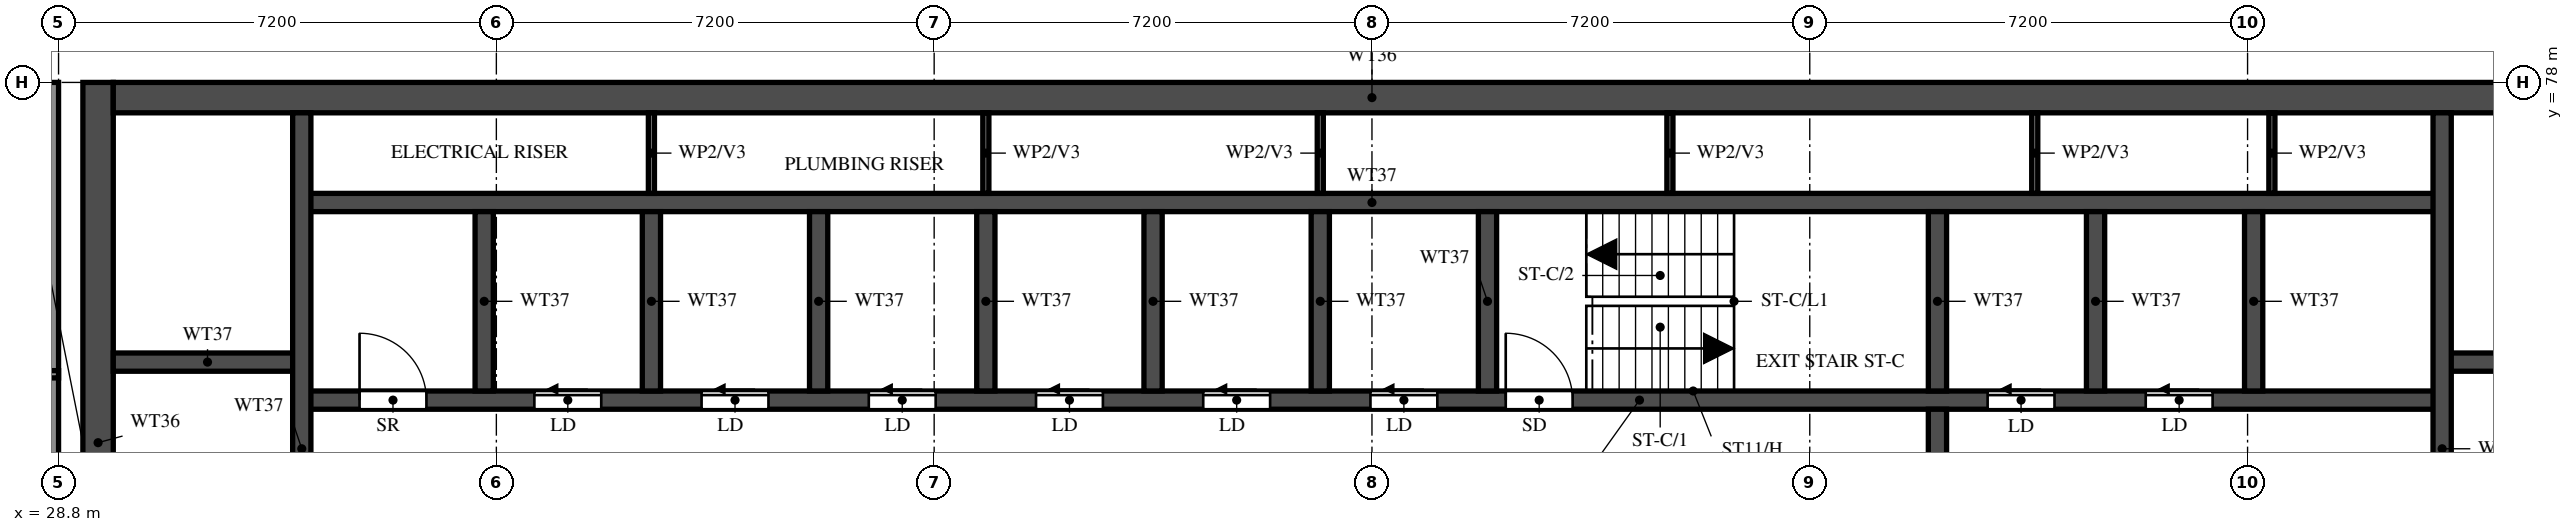
"""IFC4 building model, lengths in metres.
Left out: names, types, materials, properties, quantities, classifications, styles, units other than length and angle.
Written with IfcOpenShell. Run it as: python <this file> out.ifc"""

import sys

from ifc_helpers import new_model, si_unit, direction, frame, frame_2d, origin, place, context, subcontext, project, spatial, rectangle, extrude, element, fill, save


model = new_model("IFC4")
c1 = context("Model", 3, precision=1e-05, world=origin(), true_north=direction((0.0, 1.0)))
c2 = subcontext(c1, "Body", "Model", "MODEL_VIEW")
j1 = project(units=[si_unit("LENGTHUNIT", "METRE"), si_unit("PLANEANGLEUNIT", "RADIAN")], contexts=[c1])
p1 = place(None, origin())
s1 = spatial("IfcSite", under=j1, at=p1, CompositionType="ELEMENT")
p2 = place(p1, origin())
s2 = spatial("IfcBuilding", under=s1, at=p2, CompositionType="ELEMENT")
p3 = place(p2, frame((0.0, 0.0, 243.0)))
s3 = spatial("IfcBuildingStorey", under=s2, at=p3, CompositionType="ELEMENT", Elevation=243.0)
p4 = place(p3, frame((29.45, 66.15, 0.0), z_axis=(0.0, 0.0, 1.0), x_axis=(0.0, 1.0, 0.0)))
e1 = element("IfcWall", 1, at=p4, inside=s3, PredefinedType="SHEAR", context=c2, shape_type="SweptSolid", body=[
    extrude(rectangle(XDim=11.85, YDim=0.5, at=frame_2d((5.925, 0.0))), origin(), (0.0, 0.0, 1.0), 3.22),
])
p5 = place(p3, frame((29.7, 77.75, 0.0), z_axis=(0.0, 0.0, 1.0), x_axis=(1.0, 0.0, 0.0)))
e2 = element("IfcWall", 2, at=p5, inside=s3, PredefinedType="SHEAR", context=c2, shape_type="SweptSolid", body=[
    extrude(rectangle(XDim=41.4, YDim=0.5, at=frame_2d((20.7, 0.0))), origin(), (0.0, 0.0, 1.0), 3.22),
])
p6 = place(p3, frame((32.8, 72.775, 0.0), z_axis=(0.0, 0.0, 1.0), x_axis=(1.0, 0.0, 0.0)))
e3 = element("IfcWall", 3, at=p6, inside=s3, PredefinedType="SHEAR", context=c2, shape_type="SweptSolid", body=[
    extrude(rectangle(XDim=35.2, YDim=0.3, at=frame_2d((17.6, 0.0))), origin(), (0.0, 0.0, 1.0), 3.22),
])
p7 = place(p6, frame((19.8, 0.0, 0.0)))
e4 = element("IfcOpeningElement", 4, at=p7, cuts=e3, PredefinedType="OPENING", context=c2, shape_type="SweptSolid", body=[
    extrude(rectangle(XDim=1.1, YDim=2.1, at=frame_2d((0.55, 1.05))), frame((0.0, 0.16, 0.0), z_axis=(0.0, -1.0, 0.0), x_axis=(1.0, 0.0, 0.0)), (0.0, 0.0, 1.0), 0.32),
])
p8 = place(p6, frame((27.725, 0.0, 0.0)))
e5 = element("IfcOpeningElement", 5, at=p8, cuts=e3, PredefinedType="OPENING", context=c2, shape_type="SweptSolid", body=[
    extrude(rectangle(XDim=1.1, YDim=2.1, at=frame_2d((0.55, 1.05))), frame((0.0, 0.16, 0.0), z_axis=(0.0, -1.0, 0.0), x_axis=(1.0, 0.0, 0.0)), (0.0, 0.0, 1.0), 0.32),
])
p9 = place(p6, frame((30.325, 0.0, 0.0)))
e6 = element("IfcOpeningElement", 6, at=p9, cuts=e3, PredefinedType="OPENING", context=c2, shape_type="SweptSolid", body=[
    extrude(rectangle(XDim=1.1, YDim=2.1, at=frame_2d((0.55, 1.05))), frame((0.0, 0.16, 0.0), z_axis=(0.0, -1.0, 0.0), x_axis=(1.0, 0.0, 0.0)), (0.0, 0.0, 1.0), 0.32),
])
p10 = place(p6, frame((3.825, 0.0, 0.0)))
e7 = element("IfcOpeningElement", 7, at=p10, cuts=e3, PredefinedType="OPENING", context=c2, shape_type="SweptSolid", body=[
    extrude(rectangle(XDim=1.1, YDim=2.1, at=frame_2d((0.55, 1.05))), frame((0.0, 0.16, 0.0), z_axis=(0.0, -1.0, 0.0), x_axis=(1.0, 0.0, 0.0)), (0.0, 0.0, 1.0), 0.32),
])
p11 = place(p6, frame((6.575, 0.0, 0.0)))
e8 = element("IfcOpeningElement", 8, at=p11, cuts=e3, PredefinedType="OPENING", context=c2, shape_type="SweptSolid", body=[
    extrude(rectangle(XDim=1.1, YDim=2.1, at=frame_2d((0.55, 1.05))), frame((0.0, 0.16, 0.0), z_axis=(0.0, -1.0, 0.0), x_axis=(1.0, 0.0, 0.0)), (0.0, 0.0, 1.0), 0.32),
])
p12 = place(p6, frame((9.325, 0.0, 0.0)))
e9 = element("IfcOpeningElement", 9, at=p12, cuts=e3, PredefinedType="OPENING", context=c2, shape_type="SweptSolid", body=[
    extrude(rectangle(XDim=1.1, YDim=2.1, at=frame_2d((0.55, 1.05))), frame((0.0, 0.16, 0.0), z_axis=(0.0, -1.0, 0.0), x_axis=(1.0, 0.0, 0.0)), (0.0, 0.0, 1.0), 0.32),
])
p13 = place(p6, frame((12.075, 0.0, 0.0)))
e10 = element("IfcOpeningElement", 10, at=p13, cuts=e3, PredefinedType="OPENING", context=c2, shape_type="SweptSolid", body=[
    extrude(rectangle(XDim=1.1, YDim=2.1, at=frame_2d((0.55, 1.05))), frame((0.0, 0.16, 0.0), z_axis=(0.0, -1.0, 0.0), x_axis=(1.0, 0.0, 0.0)), (0.0, 0.0, 1.0), 0.32),
])
p14 = place(p6, frame((14.825, 0.0, 0.0)))
e11 = element("IfcOpeningElement", 11, at=p14, cuts=e3, PredefinedType="OPENING", context=c2, shape_type="SweptSolid", body=[
    extrude(rectangle(XDim=1.1, YDim=2.1, at=frame_2d((0.55, 1.05))), frame((0.0, 0.16, 0.0), z_axis=(0.0, -1.0, 0.0), x_axis=(1.0, 0.0, 0.0)), (0.0, 0.0, 1.0), 0.32),
])
p15 = place(p6, frame((17.575, 0.0, 0.0)))
e12 = element("IfcOpeningElement", 12, at=p15, cuts=e3, PredefinedType="OPENING", context=c2, shape_type="SweptSolid", body=[
    extrude(rectangle(XDim=1.1, YDim=2.1, at=frame_2d((0.55, 1.05))), frame((0.0, 0.16, 0.0), z_axis=(0.0, -1.0, 0.0), x_axis=(1.0, 0.0, 0.0)), (0.0, 0.0, 1.0), 0.32),
])
p16 = place(p6, frame((0.95, 0.0, 0.0)))
e13 = element("IfcOpeningElement", 13, at=p16, cuts=e3, PredefinedType="OPENING", context=c2, shape_type="SweptSolid", body=[
    extrude(rectangle(XDim=1.1, YDim=2.1, at=frame_2d((0.55, 1.05))), frame((0.0, 0.16, 0.0), z_axis=(0.0, -1.0, 0.0), x_axis=(1.0, 0.0, 0.0)), (0.0, 0.0, 1.0), 0.32),
])
p17 = place(p3, frame((32.8, 76.025, 0.0), z_axis=(0.0, 0.0, 1.0), x_axis=(1.0, 0.0, 0.0)))
e14 = element("IfcWall", 14, at=p17, inside=s3, PredefinedType="SHEAR", context=c2, shape_type="SweptSolid", body=[
    extrude(rectangle(XDim=35.2, YDim=0.3, at=frame_2d((17.6, 0.0))), origin(), (0.0, 0.0, 1.0), 3.22),
])
for number, where, z_axis, x_axis in (
    (15, (29.7, 73.4, 0.0), (0.0, 0.0, 1.0), (1.0, 0.0, 0.0)),
    (16, (68.0, 73.4, 0.0), (0.0, 0.0, 1.0), (1.0, 0.0, 0.0)),
):
    element("IfcWall", number, at=place(p3, frame(where, z_axis=z_axis, x_axis=x_axis)), inside=s3, PredefinedType="SHEAR", context=c2, shape_type="SweptSolid", body=[
        extrude(rectangle(XDim=3.1, YDim=0.3, at=frame_2d((1.55, 0.0))), origin(), (0.0, 0.0, 1.0), 3.22),
    ])
p18 = place(p3, frame((32.8, 66.45, 0.0), z_axis=(0.0, 0.0, 1.0), x_axis=(0.0, 1.0, 0.0)))
e17 = element("IfcWall", 17, at=p18, inside=s3, PredefinedType="SHEAR", context=c2, shape_type="SweptSolid", body=[
    extrude(rectangle(XDim=11.05, YDim=0.3, at=frame_2d((5.525, 0.0))), origin(), (0.0, 0.0, 1.0), 3.22),
])
p19 = place(p3, frame((68.0, 66.45, 0.0), z_axis=(0.0, 0.0, 1.0), x_axis=(0.0, 1.0, 0.0)))
e18 = element("IfcWall", 18, at=p19, inside=s3, PredefinedType="SHEAR", context=c2, shape_type="SweptSolid", body=[
    extrude(rectangle(XDim=11.05, YDim=0.3, at=frame_2d((5.525, 0.0))), origin(), (0.0, 0.0, 1.0), 3.22),
])
p20 = place(p19, frame((0.15, 0.0, 0.0)))
e19 = element("IfcOpeningElement", 19, at=p20, cuts=e18, PredefinedType="OPENING", context=c2, shape_type="SweptSolid", body=[
    extrude(rectangle(XDim=1.1, YDim=2.1, at=frame_2d((0.55, 1.05))), frame((0.0, 0.16, 0.0), z_axis=(0.0, -1.0, 0.0), x_axis=(1.0, 0.0, 0.0)), (0.0, 0.0, 1.0), 0.32),
])
p21 = place(p3, frame((59.7, 66.45, 0.0), z_axis=(0.0, 0.0, 1.0), x_axis=(0.0, 1.0, 0.0)))
e20 = element("IfcWall", 20, at=p21, inside=s3, PredefinedType="SHEAR", context=c2, shape_type="SweptSolid", body=[
    extrude(rectangle(XDim=6.175, YDim=0.3, at=frame_2d((3.087, 0.0))), origin(), (0.0, 0.0, 1.0), 3.22),
])
p22 = place(p21, frame((3.85, 0.0, 0.0)))
e21 = element("IfcOpeningElement", 21, at=p22, cuts=e20, PredefinedType="OPENING", context=c2, shape_type="SweptSolid", body=[
    extrude(rectangle(XDim=1.2, YDim=2.1, at=frame_2d((0.6, 1.05))), frame((0.0, 0.16, 0.0), z_axis=(0.0, -1.0, 0.0), x_axis=(1.0, 0.0, 0.0)), (0.0, 0.0, 1.0), 0.32),
])
for number, where, z_axis, x_axis in (
    (22, (59.7, 72.925, 0.0), (0.0, 0.0, 1.0), (0.0, 1.0, 0.0)),
    (23, (35.8, 72.925, 0.0), (0.0, 0.0, 1.0), (0.0, 1.0, 0.0)),
    (24, (38.55, 72.925, 0.0), (0.0, 0.0, 1.0), (0.0, 1.0, 0.0)),
    (25, (41.3, 72.925, 0.0), (0.0, 0.0, 1.0), (0.0, 1.0, 0.0)),
    (26, (44.05, 72.925, 0.0), (0.0, 0.0, 1.0), (0.0, 1.0, 0.0)),
    (27, (46.8, 72.925, 0.0), (0.0, 0.0, 1.0), (0.0, 1.0, 0.0)),
    (28, (49.55, 72.925, 0.0), (0.0, 0.0, 1.0), (0.0, 1.0, 0.0)),
    (29, (52.3, 72.925, 0.0), (0.0, 0.0, 1.0), (0.0, 1.0, 0.0)),
    (30, (62.3, 72.925, 0.0), (0.0, 0.0, 1.0), (0.0, 1.0, 0.0)),
    (31, (64.9, 72.925, 0.0), (0.0, 0.0, 1.0), (0.0, 1.0, 0.0)),
):
    element("IfcWall", number, at=place(p3, frame(where, z_axis=z_axis, x_axis=x_axis)), inside=s3, PredefinedType="SHEAR", context=c2, shape_type="SweptSolid", body=[
        extrude(rectangle(XDim=2.95, YDim=0.3, at=frame_2d((1.475, 0.0))), origin(), (0.0, 0.0, 1.0), 3.22),
    ])
for number, where, z_axis, x_axis in (
    (32, (38.55, 76.175, 0.0), (0.0, 0.0, 1.0), (0.0, 1.0, 0.0)),
    (33, (44.05, 76.175, 0.0), (0.0, 0.0, 1.0), (0.0, 1.0, 0.0)),
    (34, (49.55, 76.175, 0.0), (0.0, 0.0, 1.0), (0.0, 1.0, 0.0)),
    (35, (55.3, 76.175, 0.0), (0.0, 0.0, 1.0), (0.0, 1.0, 0.0)),
    (36, (61.3, 76.175, 0.0), (0.0, 0.0, 1.0), (0.0, 1.0, 0.0)),
    (37, (65.2, 76.175, 0.0), (0.0, 0.0, 1.0), (0.0, 1.0, 0.0)),
):
    element("IfcWall", number, at=place(p3, frame(where, z_axis=z_axis, x_axis=x_axis)), inside=s3, PredefinedType="PARTITIONING", context=c2, shape_type="SweptSolid", body=[
        extrude(rectangle(XDim=1.325, YDim=0.1, at=frame_2d((0.663, 0.0))), origin(), (0.0, 0.0, 1.0), 3.22),
    ])
p23 = place(p3, frame((28.7, 62.4, 0.0), z_axis=(0.0, 0.0, 1.0), x_axis=(0.0, 1.0, 0.0)))
e38 = element("IfcWall", 38, at=p23, inside=s3, PredefinedType="SOLIDWALL", context=c2, shape_type="SweptSolid", body=[
    extrude(rectangle(XDim=15.6, YDim=0.2, at=frame_2d((7.8, 0.0))), origin(), (0.0, 0.0, 1.0), 3.22),
])
p24 = place(p3, frame((18.525, 73.2, 0.0), z_axis=(0.0, 0.0, 1.0), x_axis=(1.0, 0.0, 0.0)))
e39 = element("IfcWall", 39, at=p24, inside=s3, PredefinedType="PARTITIONING", context=c2, shape_type="SweptSolid", body=[
    extrude(rectangle(XDim=10.275, YDim=0.12, at=frame_2d((5.138, 0.0))), origin(), (0.0, 0.0, 1.0), 2.32),
])
p25 = place(p24, frame((5.275, 0.0, 0.0)))
e40 = element("IfcOpeningElement", 40, at=p25, cuts=e39, PredefinedType="OPENING", context=c2, shape_type="SweptSolid", body=[
    extrude(rectangle(XDim=0.9, YDim=2.1, at=frame_2d((0.45, 1.05))), frame((0.0, 0.07, 0.0), z_axis=(0.0, -1.0, 0.0), x_axis=(1.0, 0.0, 0.0)), (0.0, 0.0, 1.0), 0.14),
])
p26 = place(p7, origin())
e41 = element("IfcDoor", 41, at=p26, inside=s3, OperationType="SINGLE_SWING_LEFT", PredefinedType="DOOR", context=c2, shape_type="SweptSolid", body=[
    extrude(rectangle(XDim=1.1, YDim=2.1, at=frame_2d((0.55, 1.05))), frame((0.0, 0.025, 0.0), z_axis=(0.0, -1.0, 0.0), x_axis=(1.0, 0.0, 0.0)), (0.0, 0.0, 1.0), 0.05),
])
fill(e4, e41)
p27 = place(p8, origin())
e42 = element("IfcDoor", 42, at=p27, inside=s3, OperationType="SLIDING_TO_LEFT", PredefinedType="DOOR", context=c2, shape_type="SweptSolid", body=[
    extrude(rectangle(XDim=1.1, YDim=2.1, at=frame_2d((0.55, 1.05))), frame((0.0, 0.025, 0.0), z_axis=(0.0, -1.0, 0.0), x_axis=(1.0, 0.0, 0.0)), (0.0, 0.0, 1.0), 0.05),
])
fill(e5, e42)
p28 = place(p9, origin())
e43 = element("IfcDoor", 43, at=p28, inside=s3, OperationType="SLIDING_TO_LEFT", PredefinedType="DOOR", context=c2, shape_type="SweptSolid", body=[
    extrude(rectangle(XDim=1.1, YDim=2.1, at=frame_2d((0.55, 1.05))), frame((0.0, 0.025, 0.0), z_axis=(0.0, -1.0, 0.0), x_axis=(1.0, 0.0, 0.0)), (0.0, 0.0, 1.0), 0.05),
])
fill(e6, e43)
p29 = place(p10, origin())
e44 = element("IfcDoor", 44, at=p29, inside=s3, OperationType="SLIDING_TO_LEFT", PredefinedType="DOOR", context=c2, shape_type="SweptSolid", body=[
    extrude(rectangle(XDim=1.1, YDim=2.1, at=frame_2d((0.55, 1.05))), frame((0.0, 0.025, 0.0), z_axis=(0.0, -1.0, 0.0), x_axis=(1.0, 0.0, 0.0)), (0.0, 0.0, 1.0), 0.05),
])
fill(e7, e44)
p30 = place(p11, origin())
e45 = element("IfcDoor", 45, at=p30, inside=s3, OperationType="SLIDING_TO_LEFT", PredefinedType="DOOR", context=c2, shape_type="SweptSolid", body=[
    extrude(rectangle(XDim=1.1, YDim=2.1, at=frame_2d((0.55, 1.05))), frame((0.0, 0.025, 0.0), z_axis=(0.0, -1.0, 0.0), x_axis=(1.0, 0.0, 0.0)), (0.0, 0.0, 1.0), 0.05),
])
fill(e8, e45)
p31 = place(p12, origin())
e46 = element("IfcDoor", 46, at=p31, inside=s3, OperationType="SLIDING_TO_LEFT", PredefinedType="DOOR", context=c2, shape_type="SweptSolid", body=[
    extrude(rectangle(XDim=1.1, YDim=2.1, at=frame_2d((0.55, 1.05))), frame((0.0, 0.025, 0.0), z_axis=(0.0, -1.0, 0.0), x_axis=(1.0, 0.0, 0.0)), (0.0, 0.0, 1.0), 0.05),
])
fill(e9, e46)
p32 = place(p13, origin())
e47 = element("IfcDoor", 47, at=p32, inside=s3, OperationType="SLIDING_TO_LEFT", PredefinedType="DOOR", context=c2, shape_type="SweptSolid", body=[
    extrude(rectangle(XDim=1.1, YDim=2.1, at=frame_2d((0.55, 1.05))), frame((0.0, 0.025, 0.0), z_axis=(0.0, -1.0, 0.0), x_axis=(1.0, 0.0, 0.0)), (0.0, 0.0, 1.0), 0.05),
])
fill(e10, e47)
p33 = place(p14, origin())
e48 = element("IfcDoor", 48, at=p33, inside=s3, OperationType="SLIDING_TO_LEFT", PredefinedType="DOOR", context=c2, shape_type="SweptSolid", body=[
    extrude(rectangle(XDim=1.1, YDim=2.1, at=frame_2d((0.55, 1.05))), frame((0.0, 0.025, 0.0), z_axis=(0.0, -1.0, 0.0), x_axis=(1.0, 0.0, 0.0)), (0.0, 0.0, 1.0), 0.05),
])
fill(e11, e48)
p34 = place(p15, origin())
e49 = element("IfcDoor", 49, at=p34, inside=s3, OperationType="SLIDING_TO_LEFT", PredefinedType="DOOR", context=c2, shape_type="SweptSolid", body=[
    extrude(rectangle(XDim=1.1, YDim=2.1, at=frame_2d((0.55, 1.05))), frame((0.0, 0.025, 0.0), z_axis=(0.0, -1.0, 0.0), x_axis=(1.0, 0.0, 0.0)), (0.0, 0.0, 1.0), 0.05),
])
fill(e12, e49)
p35 = place(p16, origin())
e50 = element("IfcDoor", 50, at=p35, inside=s3, OperationType="SINGLE_SWING_LEFT", PredefinedType="DOOR", context=c2, shape_type="SweptSolid", body=[
    extrude(rectangle(XDim=1.1, YDim=2.1, at=frame_2d((0.55, 1.05))), frame((0.0, 0.025, 0.0), z_axis=(0.0, -1.0, 0.0), x_axis=(1.0, 0.0, 0.0)), (0.0, 0.0, 1.0), 0.05),
])
fill(e13, e50)
save(model, sys.argv[1])
